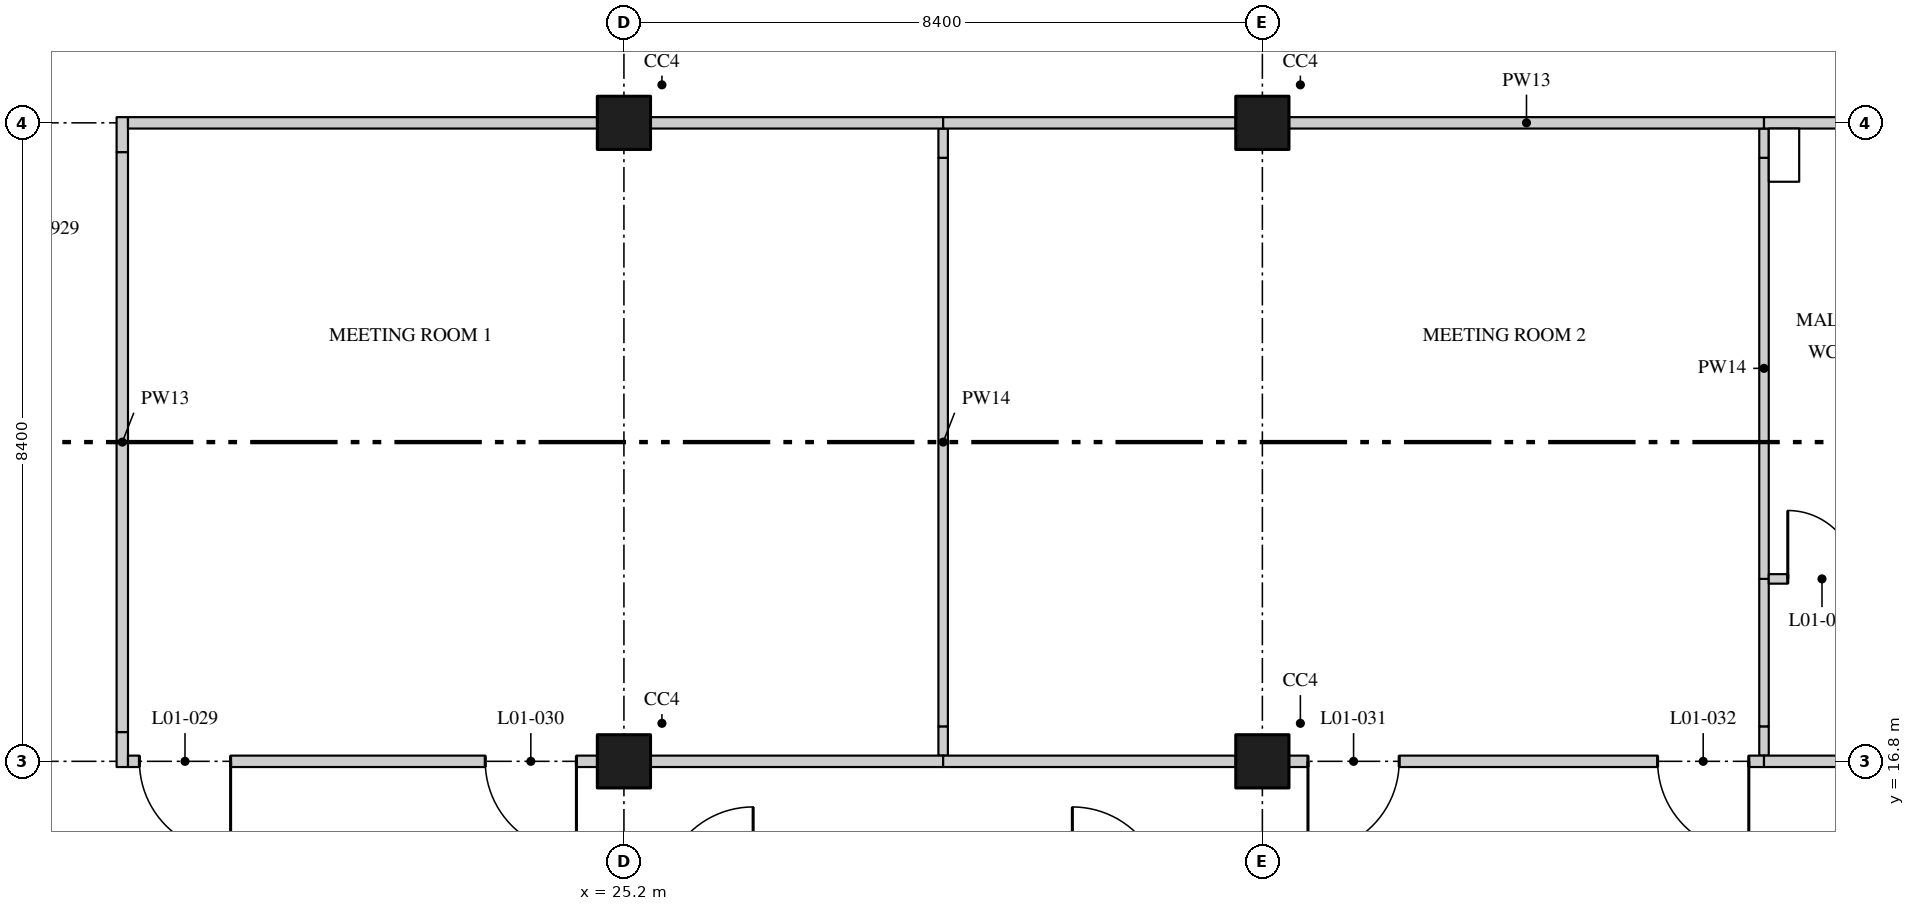
"""IFC4 building model, lengths in metres.
Left out: names, types, materials, properties, quantities, classifications, styles, units other than length and angle.
Written with IfcOpenShell. Run it as: python <this file> out.ifc"""

import sys

from ifc_helpers import new_model, si_unit, direction, frame, frame_2d, origin, origin_2d, place, context, subcontext, project, spatial, rectangle, extrude, element, fill, save


model = new_model("IFC4")
c1 = context("Model", 3, precision=1e-05, world=origin(), true_north=direction((0.0, 1.0)))
c2 = subcontext(c1, "Body", "Model", "MODEL_VIEW")
j1 = project(units=[si_unit("LENGTHUNIT", "METRE"), si_unit("PLANEANGLEUNIT", "RADIAN")], contexts=[c1])
p1 = place(None, origin())
s1 = spatial("IfcSite", under=j1, at=p1, CompositionType="ELEMENT")
p2 = place(p1, origin())
s2 = spatial("IfcBuilding", under=s1, at=p2, CompositionType="ELEMENT")
p3 = place(p2, frame((0.0, 0.0, 5.4)))
s3 = spatial("IfcBuildingStorey", under=s2, at=p3, CompositionType="ELEMENT", Elevation=5.4)
for number, where, z_axis, x_axis in (
    (1, (25.2, 16.8, 0.0), (0.0, 0.0, 1.0), (1.0, 0.0, 0.0)),
    (2, (25.2, 25.2, 0.0), (0.0, 0.0, 1.0), (1.0, 0.0, 0.0)),
    (3, (33.6, 16.8, 0.0), (0.0, 0.0, 1.0), (1.0, 0.0, 0.0)),
    (4, (33.6, 25.2, 0.0), (0.0, 0.0, 1.0), (1.0, 0.0, 0.0)),
):
    element("IfcColumn", number, at=place(p3, frame(where, z_axis=z_axis, x_axis=x_axis)), inside=s3, PredefinedType="COLUMN", context=c2, shape_type="SweptSolid", body=[
        extrude(rectangle(XDim=0.7, YDim=0.7, at=origin_2d()), origin(), (0.0, 0.0, 1.0), 4.37),
    ])
p4 = place(p3, frame((29.4, 16.875, 0.0), z_axis=(0.0, 0.0, 1.0), x_axis=(0.0, 1.0, 0.0)))
e5 = element("IfcWall", 5, at=p4, inside=s3, PredefinedType="PARTITIONING", context=c2, shape_type="SweptSolid", body=[
    extrude(rectangle(XDim=0.385, YDim=0.125, at=frame_2d((0.192, 0.0))), origin(), (0.0, 0.0, 1.0), 3.746),
])
p5 = place(p3, frame((29.4, 17.26, 0.0), z_axis=(0.0, 0.0, 1.0), x_axis=(0.0, 1.0, 0.0)))
e6 = element("IfcWall", 6, at=p5, inside=s3, PredefinedType="PARTITIONING", context=c2, shape_type="SweptSolid", body=[
    extrude(rectangle(XDim=7.48, YDim=0.125, at=frame_2d((3.74, 0.0))), origin(), (0.0, 0.0, 1.0), 4.37),
])
p6 = place(p3, frame((29.4, 24.74, 0.0), z_axis=(0.0, 0.0, 1.0), x_axis=(0.0, 1.0, 0.0)))
e7 = element("IfcWall", 7, at=p6, inside=s3, PredefinedType="PARTITIONING", context=c2, shape_type="SweptSolid", body=[
    extrude(rectangle(XDim=0.385, YDim=0.125, at=frame_2d((0.192, 0.0))), origin(), (0.0, 0.0, 1.0), 3.746),
])
p7 = place(p3, frame((18.6, 16.725, 0.0), z_axis=(0.0, 0.0, 1.0), x_axis=(0.0, 1.0, 0.0)))
e8 = element("IfcWall", 8, at=p7, inside=s3, PredefinedType="PARTITIONING", context=c2, shape_type="SweptSolid", body=[
    extrude(rectangle(XDim=0.46, YDim=0.15, at=frame_2d((0.23, 0.0))), origin(), (0.0, 0.0, 1.0), 3.746),
])
p8 = place(p3, frame((18.6, 17.185, 0.0), z_axis=(0.0, 0.0, 1.0), x_axis=(0.0, 1.0, 0.0)))
e9 = element("IfcWall", 9, at=p8, inside=s3, PredefinedType="PARTITIONING", context=c2, shape_type="SweptSolid", body=[
    extrude(rectangle(XDim=7.63, YDim=0.15, at=frame_2d((3.815, 0.0))), origin(), (0.0, 0.0, 1.0), 4.37),
])
p9 = place(p3, frame((18.6, 24.815, 0.0), z_axis=(0.0, 0.0, 1.0), x_axis=(0.0, 1.0, 0.0)))
e10 = element("IfcWall", 10, at=p9, inside=s3, PredefinedType="PARTITIONING", context=c2, shape_type="SweptSolid", body=[
    extrude(rectangle(XDim=0.46, YDim=0.15, at=frame_2d((0.23, 0.0))), origin(), (0.0, 0.0, 1.0), 3.746),
])
p10 = place(p3, frame((18.675, 16.8, 0.0), z_axis=(0.0, 0.0, 1.0), x_axis=(1.0, 0.0, 0.0)))
e11 = element("IfcWall", 11, at=p10, inside=s3, PredefinedType="PARTITIONING", context=c2, shape_type="SweptSolid", body=[
    extrude(rectangle(XDim=6.175, YDim=0.15, at=frame_2d((3.087, 0.0))), origin(), (0.0, 0.0, 1.0), 3.746),
])
p11 = place(p10, frame((0.15, 0.0, 0.0)))
e12 = element("IfcOpeningElement", 12, at=p11, cuts=e11, PredefinedType="OPENING", context=c2, shape_type="SweptSolid", body=[
    extrude(rectangle(XDim=1.2, YDim=2.4, at=frame_2d((0.6, 1.2))), frame((0.0, 0.085, 0.0), z_axis=(0.0, -1.0, 0.0), x_axis=(1.0, 0.0, 0.0)), (0.0, 0.0, 1.0), 0.17),
])
p12 = place(p10, frame((4.7, 0.0, 0.0)))
e13 = element("IfcOpeningElement", 13, at=p12, cuts=e11, PredefinedType="OPENING", context=c2, shape_type="SweptSolid", body=[
    extrude(rectangle(XDim=1.2, YDim=2.4, at=frame_2d((0.6, 1.2))), frame((0.0, 0.085, 0.0), z_axis=(0.0, -1.0, 0.0), x_axis=(1.0, 0.0, 0.0)), (0.0, 0.0, 1.0), 0.17),
])
p13 = place(p3, frame((25.55, 16.8, 0.0), z_axis=(0.0, 0.0, 1.0), x_axis=(1.0, 0.0, 0.0)))
e14 = element("IfcWall", 14, at=p13, inside=s3, PredefinedType="PARTITIONING", context=c2, shape_type="SweptSolid", body=[
    extrude(rectangle(XDim=3.85, YDim=0.15, at=frame_2d((1.925, 0.0))), origin(), (0.0, 0.0, 1.0), 3.746),
])
p14 = place(p3, frame((18.675, 25.2, 0.0), z_axis=(0.0, 0.0, 1.0), x_axis=(1.0, 0.0, 0.0)))
e15 = element("IfcWall", 15, at=p14, inside=s3, PredefinedType="PARTITIONING", context=c2, shape_type="SweptSolid", body=[
    extrude(rectangle(XDim=6.175, YDim=0.15, at=frame_2d((3.087, 0.0))), origin(), (0.0, 0.0, 1.0), 3.746),
])
p15 = place(p3, frame((25.55, 25.2, 0.0), z_axis=(0.0, 0.0, 1.0), x_axis=(1.0, 0.0, 0.0)))
e16 = element("IfcWall", 16, at=p15, inside=s3, PredefinedType="PARTITIONING", context=c2, shape_type="SweptSolid", body=[
    extrude(rectangle(XDim=3.85, YDim=0.15, at=frame_2d((1.925, 0.0))), origin(), (0.0, 0.0, 1.0), 3.746),
])
p16 = place(p3, frame((40.2, 16.875, 0.0), z_axis=(0.0, 0.0, 1.0), x_axis=(0.0, 1.0, 0.0)))
e17 = element("IfcWall", 17, at=p16, inside=s3, PredefinedType="PARTITIONING", context=c2, shape_type="SweptSolid", body=[
    extrude(rectangle(XDim=0.385, YDim=0.125, at=frame_2d((0.192, 0.0))), origin(), (0.0, 0.0, 1.0), 3.746),
])
p17 = place(p3, frame((40.2, 17.26, 0.0), z_axis=(0.0, 0.0, 1.0), x_axis=(0.0, 1.0, 0.0)))
e18 = element("IfcWall", 18, at=p17, inside=s3, PredefinedType="PARTITIONING", context=c2, shape_type="SweptSolid", body=[
    extrude(rectangle(XDim=1.94, YDim=0.125, at=frame_2d((0.97, 0.0))), origin(), (0.0, 0.0, 1.0), 4.37),
])
p18 = place(p3, frame((40.2, 19.2, 0.0), z_axis=(0.0, 0.0, 1.0), x_axis=(0.0, 1.0, 0.0)))
e19 = element("IfcWall", 19, at=p18, inside=s3, PredefinedType="PARTITIONING", context=c2, shape_type="SweptSolid", body=[
    extrude(rectangle(XDim=5.54, YDim=0.125, at=frame_2d((2.77, 0.0))), origin(), (0.0, 0.0, 1.0), 4.37),
])
p19 = place(p3, frame((40.2, 24.74, 0.0), z_axis=(0.0, 0.0, 1.0), x_axis=(0.0, 1.0, 0.0)))
e20 = element("IfcWall", 20, at=p19, inside=s3, PredefinedType="PARTITIONING", context=c2, shape_type="SweptSolid", body=[
    extrude(rectangle(XDim=0.385, YDim=0.125, at=frame_2d((0.192, 0.0))), origin(), (0.0, 0.0, 1.0), 3.746),
])
p20 = place(p3, frame((29.4, 16.8, 0.0), z_axis=(0.0, 0.0, 1.0), x_axis=(1.0, 0.0, 0.0)))
e21 = element("IfcWall", 21, at=p20, inside=s3, PredefinedType="PARTITIONING", context=c2, shape_type="SweptSolid", body=[
    extrude(rectangle(XDim=3.85, YDim=0.15, at=frame_2d((1.925, 0.0))), origin(), (0.0, 0.0, 1.0), 3.746),
])
p21 = place(p3, frame((33.95, 16.8, 0.0), z_axis=(0.0, 0.0, 1.0), x_axis=(1.0, 0.0, 0.0)))
e22 = element("IfcWall", 22, at=p21, inside=s3, PredefinedType="PARTITIONING", context=c2, shape_type="SweptSolid", body=[
    extrude(rectangle(XDim=6.25, YDim=0.15, at=frame_2d((3.125, 0.0))), origin(), (0.0, 0.0, 1.0), 3.746),
])
p22 = place(p21, frame((0.25, 0.0, 0.0)))
e23 = element("IfcOpeningElement", 23, at=p22, cuts=e22, PredefinedType="OPENING", context=c2, shape_type="SweptSolid", body=[
    extrude(rectangle(XDim=1.2, YDim=2.4, at=frame_2d((0.6, 1.2))), frame((0.0, 0.085, 0.0), z_axis=(0.0, -1.0, 0.0), x_axis=(1.0, 0.0, 0.0)), (0.0, 0.0, 1.0), 0.17),
])
p23 = place(p21, frame((4.85, 0.0, 0.0)))
e24 = element("IfcOpeningElement", 24, at=p23, cuts=e22, PredefinedType="OPENING", context=c2, shape_type="SweptSolid", body=[
    extrude(rectangle(XDim=1.2, YDim=2.4, at=frame_2d((0.6, 1.2))), frame((0.0, 0.085, 0.0), z_axis=(0.0, -1.0, 0.0), x_axis=(1.0, 0.0, 0.0)), (0.0, 0.0, 1.0), 0.17),
])
p24 = place(p3, frame((29.4, 25.2, 0.0), z_axis=(0.0, 0.0, 1.0), x_axis=(1.0, 0.0, 0.0)))
e25 = element("IfcWall", 25, at=p24, inside=s3, PredefinedType="PARTITIONING", context=c2, shape_type="SweptSolid", body=[
    extrude(rectangle(XDim=3.85, YDim=0.15, at=frame_2d((1.925, 0.0))), origin(), (0.0, 0.0, 1.0), 3.746),
])
p25 = place(p3, frame((33.95, 25.2, 0.0), z_axis=(0.0, 0.0, 1.0), x_axis=(1.0, 0.0, 0.0)))
e26 = element("IfcWall", 26, at=p25, inside=s3, PredefinedType="PARTITIONING", context=c2, shape_type="SweptSolid", body=[
    extrude(rectangle(XDim=6.25, YDim=0.15, at=frame_2d((3.125, 0.0))), origin(), (0.0, 0.0, 1.0), 3.746),
])
p26 = place(p3, frame((40.263, 19.2, 0.0), z_axis=(0.0, 0.0, 1.0), x_axis=(1.0, 0.0, 0.0)))
e27 = element("IfcWall", 27, at=p26, inside=s3, PredefinedType="PARTITIONING", context=c2, shape_type="SweptSolid", body=[
    extrude(rectangle(XDim=1.544, YDim=0.125, at=frame_2d((0.772, 0.0))), origin(), (0.0, 0.0, 1.0), 4.37),
])
p27 = place(p26, frame((0.25, 0.0, 0.0)))
e28 = element("IfcOpeningElement", 28, at=p27, cuts=e27, PredefinedType="OPENING", context=c2, shape_type="SweptSolid", body=[
    extrude(rectangle(XDim=0.9, YDim=2.1, at=frame_2d((0.45, 1.05))), frame((0.0, 0.073, 0.0), z_axis=(0.0, -1.0, 0.0), x_axis=(1.0, 0.0, 0.0)), (0.0, 0.0, 1.0), 0.145),
])
for number, where, z_axis, x_axis in (
    (29, (40.2, 16.8, 0.0), (0.0, 0.0, 1.0), (1.0, 0.0, 0.0)),
    (30, (40.2, 25.2, 0.0), (0.0, 0.0, 1.0), (1.0, 0.0, 0.0)),
):
    element("IfcWall", number, at=place(p3, frame(where, z_axis=z_axis, x_axis=x_axis)), inside=s3, PredefinedType="PARTITIONING", context=c2, shape_type="SweptSolid", body=[
        extrude(rectangle(XDim=1.45, YDim=0.15, at=frame_2d((0.725, 0.0))), origin(), (0.0, 0.0, 1.0), 3.746),
    ])
p28 = place(p11, frame((1.2, 0.0, 0.0), z_axis=(0.0, 0.0, 1.0), x_axis=(-1.0, 0.0, 0.0)))
e31 = element("IfcDoor", 31, at=p28, inside=s3, OperationType="SINGLE_SWING_RIGHT", PredefinedType="DOOR", context=c2, shape_type="SweptSolid", body=[
    extrude(rectangle(XDim=1.2, YDim=2.4, at=frame_2d((0.6, 1.2))), frame((0.0, 0.025, 0.0), z_axis=(0.0, -1.0, 0.0), x_axis=(1.0, 0.0, 0.0)), (0.0, 0.0, 1.0), 0.05),
])
fill(e12, e31)
p29 = place(p12, frame((1.2, 0.0, 0.0), z_axis=(0.0, 0.0, 1.0), x_axis=(-1.0, 0.0, 0.0)))
e32 = element("IfcDoor", 32, at=p29, inside=s3, OperationType="SINGLE_SWING_RIGHT", PredefinedType="DOOR", context=c2, shape_type="SweptSolid", body=[
    extrude(rectangle(XDim=1.2, YDim=2.4, at=frame_2d((0.6, 1.2))), frame((0.0, 0.025, 0.0), z_axis=(0.0, -1.0, 0.0), x_axis=(1.0, 0.0, 0.0)), (0.0, 0.0, 1.0), 0.05),
])
fill(e13, e32)
p30 = place(p22, frame((1.2, 0.0, 0.0), z_axis=(0.0, 0.0, 1.0), x_axis=(-1.0, 0.0, 0.0)))
e33 = element("IfcDoor", 33, at=p30, inside=s3, OperationType="SINGLE_SWING_LEFT", PredefinedType="DOOR", context=c2, shape_type="SweptSolid", body=[
    extrude(rectangle(XDim=1.2, YDim=2.4, at=frame_2d((0.6, 1.2))), frame((0.0, 0.025, 0.0), z_axis=(0.0, -1.0, 0.0), x_axis=(1.0, 0.0, 0.0)), (0.0, 0.0, 1.0), 0.05),
])
fill(e23, e33)
p31 = place(p23, frame((1.2, 0.0, 0.0), z_axis=(0.0, 0.0, 1.0), x_axis=(-1.0, 0.0, 0.0)))
e34 = element("IfcDoor", 34, at=p31, inside=s3, OperationType="SINGLE_SWING_RIGHT", PredefinedType="DOOR", context=c2, shape_type="SweptSolid", body=[
    extrude(rectangle(XDim=1.2, YDim=2.4, at=frame_2d((0.6, 1.2))), frame((0.0, 0.025, 0.0), z_axis=(0.0, -1.0, 0.0), x_axis=(1.0, 0.0, 0.0)), (0.0, 0.0, 1.0), 0.05),
])
fill(e24, e34)
p32 = place(p27, origin())
e35 = element("IfcDoor", 35, at=p32, inside=s3, OperationType="SINGLE_SWING_RIGHT", PredefinedType="DOOR", context=c2, shape_type="SweptSolid", body=[
    extrude(rectangle(XDim=0.9, YDim=2.1, at=frame_2d((0.45, 1.05))), frame((0.0, 0.02, 0.0), z_axis=(0.0, -1.0, 0.0), x_axis=(1.0, 0.0, 0.0)), (0.0, 0.0, 1.0), 0.04),
])
fill(e28, e35)
save(model, sys.argv[1])
